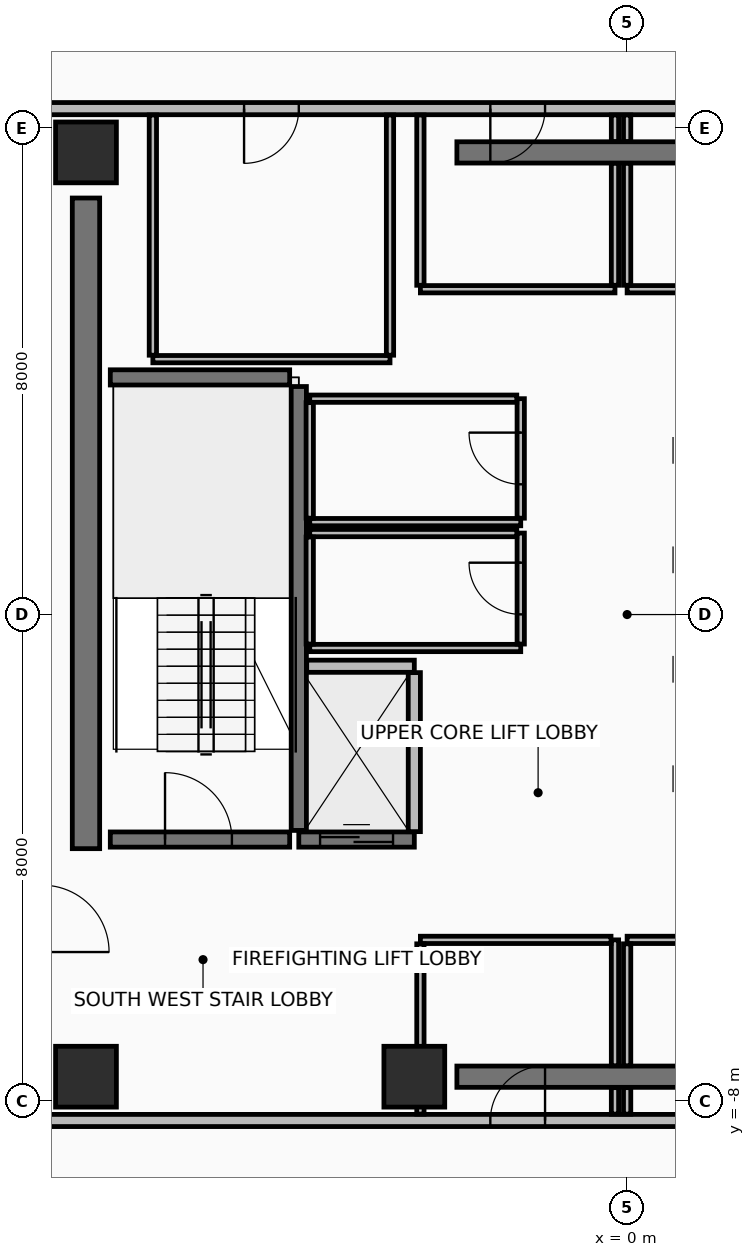
"""IFC4 building model, lengths in metres.
Left out: names, types, materials, properties, quantities, classifications, styles, units other than length and angle.
Written with IfcOpenShell. Run it as: python <this file> out.ifc"""

import sys

from ifc_helpers import new_model, si_unit, direction, frame, frame_2d, origin, origin_2d, place, context, subcontext, project, spatial, rectangle, extrude, element, fill, save


model = new_model("IFC4")
c1 = context("Model", 3, precision=1e-05, world=origin(), true_north=direction((0.0, 1.0)))
c2 = subcontext(c1, "Body", "Model", "MODEL_VIEW")
j1 = project(units=[si_unit("LENGTHUNIT", "METRE"), si_unit("PLANEANGLEUNIT", "RADIAN")], contexts=[c1])
p1 = place(None, origin())
s1 = spatial("IfcSite", under=j1, at=p1, CompositionType="ELEMENT")
p2 = place(p1, origin())
s2 = spatial("IfcBuilding", under=s1, at=p2, CompositionType="ELEMENT")
p3 = place(p2, frame((0.0, 0.0, 271.4)))
s3 = spatial("IfcBuildingStorey", under=s2, at=p3, CompositionType="ELEMENT", Elevation=271.4)
for number, where, z_axis, x_axis in (
    (1, (-8.9, -7.6, 0.0), (0.0, 0.0, 1.0), (1.0, 0.0, 0.0)),
    (2, (-3.5, -7.6, 0.0), (0.0, 0.0, 1.0), (1.0, 0.0, 0.0)),
    (3, (-8.9, 7.6, 0.0), (0.0, 0.0, 1.0), (1.0, 0.0, 0.0)),
):
    element("IfcColumn", number, at=place(p3, frame(where, z_axis=z_axis, x_axis=x_axis)), inside=s3, PredefinedType="COLUMN", context=c2, shape_type="SweptSolid", body=[
        extrude(rectangle(XDim=1.0, YDim=1.0, at=origin_2d()), origin(), (0.0, 0.0, 1.0), 3.6),
    ])
for number, where, z_axis, x_axis in (
    (4, (-2.8, -7.6, 0.0), (0.0, 0.0, 1.0), (1.0, 0.0, 0.0)),
    (5, (-2.8, 7.6, 0.0), (0.0, 0.0, 1.0), (1.0, 0.0, 0.0)),
):
    element("IfcWall", number, at=place(p3, frame(where, z_axis=z_axis, x_axis=x_axis)), inside=s3, PredefinedType="SHEAR", context=c2, shape_type="SweptSolid", body=[
        extrude(rectangle(XDim=5.38, YDim=0.35, at=frame_2d((2.69, 0.0))), origin(), (0.0, 0.0, 1.0), 3.42),
    ])
p4 = place(p3, frame((-8.9, -3.85, 0.0), z_axis=(0.0, 0.0, 1.0), x_axis=(0.0, 1.0, 0.0)))
e6 = element("IfcWall", 6, at=p4, inside=s3, PredefinedType="SHEAR", context=c2, shape_type="SweptSolid", body=[
    extrude(rectangle(XDim=10.7, YDim=0.45, at=frame_2d((5.35, 0.0))), origin(), (0.0, 0.0, 1.0), 3.42),
])
p5 = place(p3, frame((-9.62, -8.32, 0.0), z_axis=(0.0, 0.0, 1.0), x_axis=(1.0, 0.0, 0.0)))
e7 = element("IfcWall", 7, at=p5, inside=s3, PredefinedType="PARTITIONING", context=c2, shape_type="SweptSolid", body=[
    extrude(rectangle(XDim=19.24, YDim=0.2, at=frame_2d((9.62, 0.0))), origin(), (0.0, 0.0, 1.0), 2.915),
])
p6 = place(p5, frame((7.37, 0.0, 0.0)))
e8 = element("IfcOpeningElement", 8, at=p6, cuts=e7, PredefinedType="OPENING", context=c2, shape_type="SweptSolid", body=[
    extrude(rectangle(XDim=0.9, YDim=2.1, at=frame_2d((0.45, 1.05))), frame((0.0, 0.11, 0.0), z_axis=(0.0, -1.0, 0.0), x_axis=(1.0, 0.0, 0.0)), (0.0, 0.0, 1.0), 0.22),
])
p7 = place(p5, frame((10.77, 0.0, 0.0)))
e9 = element("IfcOpeningElement", 9, at=p7, cuts=e7, PredefinedType="OPENING", context=c2, shape_type="SweptSolid", body=[
    extrude(rectangle(XDim=0.9, YDim=2.1, at=frame_2d((0.45, 1.05))), frame((0.0, 0.11, 0.0), z_axis=(0.0, -1.0, 0.0), x_axis=(1.0, 0.0, 0.0)), (0.0, 0.0, 1.0), 0.22),
])
p8 = place(p3, frame((9.62, 8.32, 0.0), z_axis=(0.0, 0.0, 1.0), x_axis=(-1.0, 0.0, 0.0)))
e10 = element("IfcWall", 10, at=p8, inside=s3, PredefinedType="PARTITIONING", context=c2, shape_type="SweptSolid", body=[
    extrude(rectangle(XDim=19.24, YDim=0.2, at=frame_2d((9.62, 0.0))), origin(), (0.0, 0.0, 1.0), 2.915),
])
p9 = place(p8, frame((10.97, 0.0, 0.0)))
e11 = element("IfcOpeningElement", 11, at=p9, cuts=e10, PredefinedType="OPENING", context=c2, shape_type="SweptSolid", body=[
    extrude(rectangle(XDim=0.9, YDim=2.1, at=frame_2d((0.45, 1.05))), frame((0.0, 0.11, 0.0), z_axis=(0.0, -1.0, 0.0), x_axis=(1.0, 0.0, 0.0)), (0.0, 0.0, 1.0), 0.22),
])
p10 = place(p8, frame((7.57, 0.0, 0.0)))
e12 = element("IfcOpeningElement", 12, at=p10, cuts=e10, PredefinedType="OPENING", context=c2, shape_type="SweptSolid", body=[
    extrude(rectangle(XDim=0.9, YDim=2.1, at=frame_2d((0.45, 1.05))), frame((0.0, 0.11, 0.0), z_axis=(0.0, -1.0, 0.0), x_axis=(1.0, 0.0, 0.0)), (0.0, 0.0, 1.0), 0.22),
])
p11 = place(p8, frame((15.02, 0.0, 0.0)))
e13 = element("IfcOpeningElement", 13, at=p11, cuts=e10, PredefinedType="OPENING", context=c2, shape_type="SweptSolid", body=[
    extrude(rectangle(XDim=0.9, YDim=2.1, at=frame_2d((0.45, 1.05))), frame((0.0, 0.11, 0.0), z_axis=(0.0, -1.0, 0.0), x_axis=(1.0, 0.0, 0.0)), (0.0, 0.0, 1.0), 0.22),
])
p12 = place(p3, frame((-5.4, -3.55, 0.0), z_axis=(0.0, 0.0, 1.0), x_axis=(0.0, 1.0, 0.0)))
e14 = element("IfcWall", 14, at=p12, inside=s3, PredefinedType="SHEAR", context=c2, shape_type="SweptSolid", body=[
    extrude(rectangle(XDim=7.3, YDim=0.25, at=frame_2d((3.65, 0.0))), origin(), (0.0, 0.0, 1.0), 3.42),
])
p13 = place(p3, frame((-8.5, -3.7, 0.0), z_axis=(0.0, 0.0, 1.0), x_axis=(1.0, 0.0, 0.0)))
e15 = element("IfcWall", 15, at=p13, inside=s3, PredefinedType="SHEAR", context=c2, shape_type="SweptSolid", body=[
    extrude(rectangle(XDim=2.95, YDim=0.25, at=frame_2d((1.475, 0.0))), origin(), (0.0, 0.0, 1.0), 3.42),
])
p14 = place(p13, frame((0.9, 0.0, 0.0)))
e16 = element("IfcOpeningElement", 16, at=p14, cuts=e15, PredefinedType="OPENING", context=c2, shape_type="SweptSolid", body=[
    extrude(rectangle(XDim=1.1, YDim=2.15, at=frame_2d((0.55, 1.075))), frame((0.0, 0.135, 0.0), z_axis=(0.0, -1.0, 0.0), x_axis=(1.0, 0.0, 0.0)), (0.0, 0.0, 1.0), 0.27),
])
p15 = place(p3, frame((-8.5, 3.9, 0.0), z_axis=(0.0, 0.0, 1.0), x_axis=(1.0, 0.0, 0.0)))
e17 = element("IfcWall", 17, at=p15, inside=s3, PredefinedType="SHEAR", context=c2, shape_type="SweptSolid", body=[
    extrude(rectangle(XDim=2.95, YDim=0.25, at=frame_2d((1.475, 0.0))), origin(), (0.0, 0.0, 1.0), 3.42),
])
p16 = place(p3, frame((-5.4, -3.7, 0.0), z_axis=(0.0, 0.0, 1.0), x_axis=(1.0, 0.0, 0.0)))
e18 = element("IfcWall", 18, at=p16, inside=s3, PredefinedType="SHEAR", context=c2, shape_type="SweptSolid", body=[
    extrude(rectangle(XDim=1.9, YDim=0.25, at=frame_2d((0.95, 0.0))), origin(), (0.0, 0.0, 1.0), 3.42),
])
p17 = place(p16, frame((0.35, 0.0, 0.0)))
e19 = element("IfcOpeningElement", 19, at=p17, cuts=e18, PredefinedType="OPENING", context=c2, shape_type="SweptSolid", body=[
    extrude(rectangle(XDim=1.2, YDim=2.2, at=frame_2d((0.6, 1.1))), frame((0.0, 0.135, 0.0), z_axis=(0.0, -1.0, 0.0), x_axis=(1.0, 0.0, 0.0)), (0.0, 0.0, 1.0), 0.27),
])
p18 = place(p3, frame((-5.27, -0.85, 0.0), z_axis=(0.0, 0.0, 1.0), x_axis=(1.0, 0.0, 0.0)))
e20 = element("IfcWall", 20, at=p18, inside=s3, PredefinedType="PARTITIONING", context=c2, shape_type="SweptSolid", body=[
    extrude(rectangle(XDim=1.77, YDim=0.2, at=frame_2d((0.885, 0.0))), origin(), (0.0, 0.0, 1.0), 3.42),
])
p19 = place(p3, frame((-3.5, -3.57, 0.0), z_axis=(0.0, 0.0, 1.0), x_axis=(0.0, 1.0, 0.0)))
e21 = element("IfcWall", 21, at=p19, inside=s3, PredefinedType="PARTITIONING", context=c2, shape_type="SweptSolid", body=[
    extrude(rectangle(XDim=2.615, YDim=0.2, at=frame_2d((1.308, 0.0))), origin(), (0.0, 0.0, 1.0), 3.42),
])
p20 = place(p3, frame((-5.22, 1.52, 0.0), z_axis=(0.0, 0.0, 1.0), x_axis=(1.0, 0.0, 0.0)))
e22 = element("IfcWall", 22, at=p20, inside=s3, PredefinedType="PARTITIONING", context=c2, shape_type="SweptSolid", body=[
    extrude(rectangle(XDim=3.47, YDim=0.12, at=frame_2d((1.735, 0.0))), origin(), (0.0, 0.0, 1.0), 3.42),
])
p21 = place(p3, frame((-1.75, 1.585, 0.0), z_axis=(0.0, 0.0, 1.0), x_axis=(0.0, 1.0, 0.0)))
e23 = element("IfcWall", 23, at=p21, inside=s3, PredefinedType="PARTITIONING", context=c2, shape_type="SweptSolid", body=[
    extrude(rectangle(XDim=1.965, YDim=0.12, at=frame_2d((0.982, 0.0))), origin(), (0.0, 0.0, 1.0), 3.42),
])
p22 = place(p21, frame((0.557, 0.0, 0.0)))
e24 = element("IfcOpeningElement", 24, at=p22, cuts=e23, PredefinedType="OPENING", context=c2, shape_type="SweptSolid", body=[
    extrude(rectangle(XDim=0.85, YDim=2.1, at=frame_2d((0.425, 1.05))), frame((0.0, 0.07, 0.0), z_axis=(0.0, -1.0, 0.0), x_axis=(1.0, 0.0, 0.0)), (0.0, 0.0, 1.0), 0.14),
])
p23 = place(p3, frame((-1.815, 3.55, 0.0), z_axis=(0.0, 0.0, 1.0), x_axis=(-1.0, 0.0, 0.0)))
e25 = element("IfcWall", 25, at=p23, inside=s3, PredefinedType="PARTITIONING", context=c2, shape_type="SweptSolid", body=[
    extrude(rectangle(XDim=3.405, YDim=0.12, at=frame_2d((1.703, 0.0))), origin(), (0.0, 0.0, 1.0), 3.42),
])
p24 = place(p3, frame((-5.22, 3.485, 0.0), z_axis=(0.0, 0.0, 1.0), x_axis=(0.0, -1.0, 0.0)))
e26 = element("IfcWall", 26, at=p24, inside=s3, PredefinedType="PARTITIONING", context=c2, shape_type="SweptSolid", body=[
    extrude(rectangle(XDim=1.9, YDim=0.12, at=frame_2d((0.95, 0.0))), origin(), (0.0, 0.0, 1.0), 3.42),
])
p25 = place(p3, frame((-5.22, -0.55, 0.0), z_axis=(0.0, 0.0, 1.0), x_axis=(1.0, 0.0, 0.0)))
e27 = element("IfcWall", 27, at=p25, inside=s3, PredefinedType="PARTITIONING", context=c2, shape_type="SweptSolid", body=[
    extrude(rectangle(XDim=3.47, YDim=0.12, at=frame_2d((1.735, 0.0))), origin(), (0.0, 0.0, 1.0), 3.42),
])
p26 = place(p3, frame((-1.75, -0.485, 0.0), z_axis=(0.0, 0.0, 1.0), x_axis=(0.0, 1.0, 0.0)))
e28 = element("IfcWall", 28, at=p26, inside=s3, PredefinedType="PARTITIONING", context=c2, shape_type="SweptSolid", body=[
    extrude(rectangle(XDim=1.825, YDim=0.12, at=frame_2d((0.913, 0.0))), origin(), (0.0, 0.0, 1.0), 3.42),
])
p27 = place(p26, frame((0.488, 0.0, 0.0)))
e29 = element("IfcOpeningElement", 29, at=p27, cuts=e28, PredefinedType="OPENING", context=c2, shape_type="SweptSolid", body=[
    extrude(rectangle(XDim=0.85, YDim=2.1, at=frame_2d((0.425, 1.05))), frame((0.0, 0.07, 0.0), z_axis=(0.0, -1.0, 0.0), x_axis=(1.0, 0.0, 0.0)), (0.0, 0.0, 1.0), 0.14),
])
p28 = place(p3, frame((-1.815, 1.34, 0.0), z_axis=(0.0, 0.0, 1.0), x_axis=(-1.0, 0.0, 0.0)))
e30 = element("IfcWall", 30, at=p28, inside=s3, PredefinedType="PARTITIONING", context=c2, shape_type="SweptSolid", body=[
    extrude(rectangle(XDim=3.405, YDim=0.12, at=frame_2d((1.703, 0.0))), origin(), (0.0, 0.0, 1.0), 3.42),
])
p29 = place(p3, frame((-5.22, 1.275, 0.0), z_axis=(0.0, 0.0, 1.0), x_axis=(0.0, -1.0, 0.0)))
e31 = element("IfcWall", 31, at=p29, inside=s3, PredefinedType="PARTITIONING", context=c2, shape_type="SweptSolid", body=[
    extrude(rectangle(XDim=1.76, YDim=0.12, at=frame_2d((0.88, 0.0))), origin(), (0.0, 0.0, 1.0), 3.42),
])
p30 = place(p3, frame((-0.2, -8.215, 0.0), z_axis=(0.0, 0.0, 1.0), x_axis=(0.0, 1.0, 0.0)))
e32 = element("IfcWall", 32, at=p30, inside=s3, PredefinedType="PARTITIONING", context=c2, shape_type="SweptSolid", body=[
    extrude(rectangle(XDim=0.435, YDim=0.12, at=frame_2d((0.218, 0.0))), origin(), (0.0, 0.0, 1.0), 2.715),
])
p31 = place(p3, frame((-0.2, -7.42, 0.0), z_axis=(0.0, 0.0, 1.0), x_axis=(0.0, 1.0, 0.0)))
e33 = element("IfcWall", 33, at=p31, inside=s3, PredefinedType="PARTITIONING", context=c2, shape_type="SweptSolid", body=[
    extrude(rectangle(XDim=2.07, YDim=0.12, at=frame_2d((1.035, 0.0))), origin(), (0.0, 0.0, 1.0), 2.715),
])
p32 = place(p3, frame((-0.265, -5.35, 0.0), z_axis=(0.0, 0.0, 1.0), x_axis=(-1.0, 0.0, 0.0)))
e34 = element("IfcWall", 34, at=p32, inside=s3, PredefinedType="PARTITIONING", context=c2, shape_type="SweptSolid", body=[
    extrude(rectangle(XDim=3.135, YDim=0.12, at=frame_2d((1.567, 0.0))), origin(), (0.0, 0.0, 1.0), 2.715),
])
p33 = place(p3, frame((-3.4, -5.415, 0.0), z_axis=(0.0, 0.0, 1.0), x_axis=(0.0, -1.0, 0.0)))
e35 = element("IfcWall", 35, at=p33, inside=s3, PredefinedType="PARTITIONING", context=c2, shape_type="SweptSolid", body=[
    extrude(rectangle(XDim=2.8, YDim=0.12, at=frame_2d((1.4, 0.0))), origin(), (0.0, 0.0, 1.0), 2.715),
])
p34 = place(p3, frame((3.135, -5.35, 0.0), z_axis=(0.0, 0.0, 1.0), x_axis=(-1.0, 0.0, 0.0)))
e36 = element("IfcWall", 36, at=p34, inside=s3, PredefinedType="PARTITIONING", context=c2, shape_type="SweptSolid", body=[
    extrude(rectangle(XDim=3.135, YDim=0.12, at=frame_2d((1.567, 0.0))), origin(), (0.0, 0.0, 1.0), 3.42),
])
p35 = place(p3, frame((0.0, -5.415, 0.0), z_axis=(0.0, 0.0, 1.0), x_axis=(0.0, -1.0, 0.0)))
e37 = element("IfcWall", 37, at=p35, inside=s3, PredefinedType="PARTITIONING", context=c2, shape_type="SweptSolid", body=[
    extrude(rectangle(XDim=2.005, YDim=0.12, at=frame_2d((1.002, 0.0))), origin(), (0.0, 0.0, 1.0), 2.715),
])
p36 = place(p3, frame((0.0, -7.78, 0.0), z_axis=(0.0, 0.0, 1.0), x_axis=(0.0, -1.0, 0.0)))
e38 = element("IfcWall", 38, at=p36, inside=s3, PredefinedType="PARTITIONING", context=c2, shape_type="SweptSolid", body=[
    extrude(rectangle(XDim=0.435, YDim=0.12, at=frame_2d((0.218, 0.0))), origin(), (0.0, 0.0, 1.0), 2.715),
])
p37 = place(p3, frame((-3.4, 5.35, 0.0), z_axis=(0.0, 0.0, 1.0), x_axis=(1.0, 0.0, 0.0)))
e39 = element("IfcWall", 39, at=p37, inside=s3, PredefinedType="PARTITIONING", context=c2, shape_type="SweptSolid", body=[
    extrude(rectangle(XDim=3.2, YDim=0.12, at=frame_2d((1.6, 0.0))), origin(), (0.0, 0.0, 1.0), 3.42),
])
p38 = place(p3, frame((-0.2, 5.415, 0.0), z_axis=(0.0, 0.0, 1.0), x_axis=(0.0, 1.0, 0.0)))
e40 = element("IfcWall", 40, at=p38, inside=s3, PredefinedType="PARTITIONING", context=c2, shape_type="SweptSolid", body=[
    extrude(rectangle(XDim=2.005, YDim=0.12, at=frame_2d((1.002, 0.0))), origin(), (0.0, 0.0, 1.0), 2.715),
])
p39 = place(p3, frame((-0.2, 7.78, 0.0), z_axis=(0.0, 0.0, 1.0), x_axis=(0.0, 1.0, 0.0)))
e41 = element("IfcWall", 41, at=p39, inside=s3, PredefinedType="PARTITIONING", context=c2, shape_type="SweptSolid", body=[
    extrude(rectangle(XDim=0.435, YDim=0.12, at=frame_2d((0.218, 0.0))), origin(), (0.0, 0.0, 1.0), 2.715),
])
p40 = place(p3, frame((-3.4, 8.215, 0.0), z_axis=(0.0, 0.0, 1.0), x_axis=(0.0, -1.0, 0.0)))
e42 = element("IfcWall", 42, at=p40, inside=s3, PredefinedType="PARTITIONING", context=c2, shape_type="SweptSolid", body=[
    extrude(rectangle(XDim=2.8, YDim=0.12, at=frame_2d((1.4, 0.0))), origin(), (0.0, 0.0, 1.0), 2.715),
])
p41 = place(p3, frame((0.0, 5.35, 0.0), z_axis=(0.0, 0.0, 1.0), x_axis=(1.0, 0.0, 0.0)))
e43 = element("IfcWall", 43, at=p41, inside=s3, PredefinedType="PARTITIONING", context=c2, shape_type="SweptSolid", body=[
    extrude(rectangle(XDim=3.2, YDim=0.12, at=frame_2d((1.6, 0.0))), origin(), (0.0, 0.0, 1.0), 2.715),
])
p42 = place(p3, frame((0.0, 8.215, 0.0), z_axis=(0.0, 0.0, 1.0), x_axis=(0.0, -1.0, 0.0)))
e44 = element("IfcWall", 44, at=p42, inside=s3, PredefinedType="PARTITIONING", context=c2, shape_type="SweptSolid", body=[
    extrude(rectangle(XDim=0.435, YDim=0.12, at=frame_2d((0.218, 0.0))), origin(), (0.0, 0.0, 1.0), 2.715),
])
p43 = place(p3, frame((0.0, 7.42, 0.0), z_axis=(0.0, 0.0, 1.0), x_axis=(0.0, -1.0, 0.0)))
e45 = element("IfcWall", 45, at=p43, inside=s3, PredefinedType="PARTITIONING", context=c2, shape_type="SweptSolid", body=[
    extrude(rectangle(XDim=2.005, YDim=0.12, at=frame_2d((1.002, 0.0))), origin(), (0.0, 0.0, 1.0), 2.715),
])
p44 = place(p3, frame((-7.8, 4.2, 0.0), z_axis=(0.0, 0.0, 1.0), x_axis=(1.0, 0.0, 0.0)))
e46 = element("IfcWall", 46, at=p44, inside=s3, PredefinedType="PARTITIONING", context=c2, shape_type="SweptSolid", body=[
    extrude(rectangle(XDim=3.9, YDim=0.12, at=frame_2d((1.95, 0.0))), origin(), (0.0, 0.0, 1.0), 3.42),
])
for number, where, z_axis, x_axis in (
    (47, (-3.9, 4.265, 0.0), (0.0, 0.0, 1.0), (0.0, 1.0, 0.0)),
    (48, (-7.8, 8.215, 0.0), (0.0, 0.0, 1.0), (0.0, -1.0, 0.0)),
):
    element("IfcWall", number, at=place(p3, frame(where, z_axis=z_axis, x_axis=x_axis)), inside=s3, PredefinedType="PARTITIONING", context=c2, shape_type="SweptSolid", body=[
        extrude(rectangle(XDim=3.95, YDim=0.12, at=frame_2d((1.975, 0.0))), origin(), (0.0, 0.0, 1.0), 2.715),
    ])
p45 = place(p14, origin())
e49 = element("IfcDoor", 49, at=p45, inside=s3, OperationType="SINGLE_SWING_LEFT", PredefinedType="DOOR", context=c2, shape_type="SweptSolid", body=[
    extrude(rectangle(XDim=1.1, YDim=2.15, at=frame_2d((0.55, 1.075))), frame((0.0, 0.025, 0.0), z_axis=(0.0, -1.0, 0.0), x_axis=(1.0, 0.0, 0.0)), (0.0, 0.0, 1.0), 0.05),
])
fill(e16, e49)
p46 = place(p17, origin())
e50 = element("IfcDoor", 50, at=p46, inside=s3, OperationType="SLIDING_TO_RIGHT", PredefinedType="DOOR", context=c2, shape_type="SweptSolid", body=[
    extrude(rectangle(XDim=1.2, YDim=2.2, at=frame_2d((0.6, 1.1))), frame((0.0, 0.025, 0.0), z_axis=(0.0, -1.0, 0.0), x_axis=(1.0, 0.0, 0.0)), (0.0, 0.0, 1.0), 0.05),
])
fill(e19, e50)
p47 = place(p22, frame((0.85, 0.0, 0.0), z_axis=(0.0, 0.0, 1.0), x_axis=(-1.0, 0.0, 0.0)))
e51 = element("IfcDoor", 51, at=p47, inside=s3, OperationType="SINGLE_SWING_RIGHT", PredefinedType="DOOR", context=c2, shape_type="SweptSolid", body=[
    extrude(rectangle(XDim=0.85, YDim=2.1, at=frame_2d((0.425, 1.05))), frame((0.0, 0.025, 0.0), z_axis=(0.0, -1.0, 0.0), x_axis=(1.0, 0.0, 0.0)), (0.0, 0.0, 1.0), 0.05),
])
fill(e24, e51)
p48 = place(p27, frame((0.85, 0.0, 0.0), z_axis=(0.0, 0.0, 1.0), x_axis=(-1.0, 0.0, 0.0)))
e52 = element("IfcDoor", 52, at=p48, inside=s3, OperationType="SINGLE_SWING_RIGHT", PredefinedType="DOOR", context=c2, shape_type="SweptSolid", body=[
    extrude(rectangle(XDim=0.85, YDim=2.1, at=frame_2d((0.425, 1.05))), frame((0.0, 0.025, 0.0), z_axis=(0.0, -1.0, 0.0), x_axis=(1.0, 0.0, 0.0)), (0.0, 0.0, 1.0), 0.05),
])
fill(e29, e52)
p49 = place(p6, frame((0.9, 0.0, 0.0), z_axis=(0.0, 0.0, 1.0), x_axis=(-1.0, 0.0, 0.0)))
e53 = element("IfcDoor", 53, at=p49, inside=s3, OperationType="SINGLE_SWING_LEFT", PredefinedType="DOOR", context=c2, shape_type="SweptSolid", body=[
    extrude(rectangle(XDim=0.9, YDim=2.1, at=frame_2d((0.45, 1.05))), frame((0.0, 0.025, 0.0), z_axis=(0.0, -1.0, 0.0), x_axis=(1.0, 0.0, 0.0)), (0.0, 0.0, 1.0), 0.05),
])
fill(e8, e53)
p50 = place(p9, frame((0.9, 0.0, 0.0), z_axis=(0.0, 0.0, 1.0), x_axis=(-1.0, 0.0, 0.0)))
e54 = element("IfcDoor", 54, at=p50, inside=s3, OperationType="SINGLE_SWING_LEFT", PredefinedType="DOOR", context=c2, shape_type="SweptSolid", body=[
    extrude(rectangle(XDim=0.9, YDim=2.1, at=frame_2d((0.45, 1.05))), frame((0.0, 0.025, 0.0), z_axis=(0.0, -1.0, 0.0), x_axis=(1.0, 0.0, 0.0)), (0.0, 0.0, 1.0), 0.05),
])
fill(e11, e54)
p51 = place(p11, frame((0.9, 0.0, 0.0), z_axis=(0.0, 0.0, 1.0), x_axis=(-1.0, 0.0, 0.0)))
e55 = element("IfcDoor", 55, at=p51, inside=s3, OperationType="SINGLE_SWING_LEFT", PredefinedType="DOOR", context=c2, shape_type="SweptSolid", body=[
    extrude(rectangle(XDim=0.9, YDim=2.1, at=frame_2d((0.45, 1.05))), frame((0.0, 0.025, 0.0), z_axis=(0.0, -1.0, 0.0), x_axis=(1.0, 0.0, 0.0)), (0.0, 0.0, 1.0), 0.05),
])
fill(e13, e55)
save(model, sys.argv[1])
